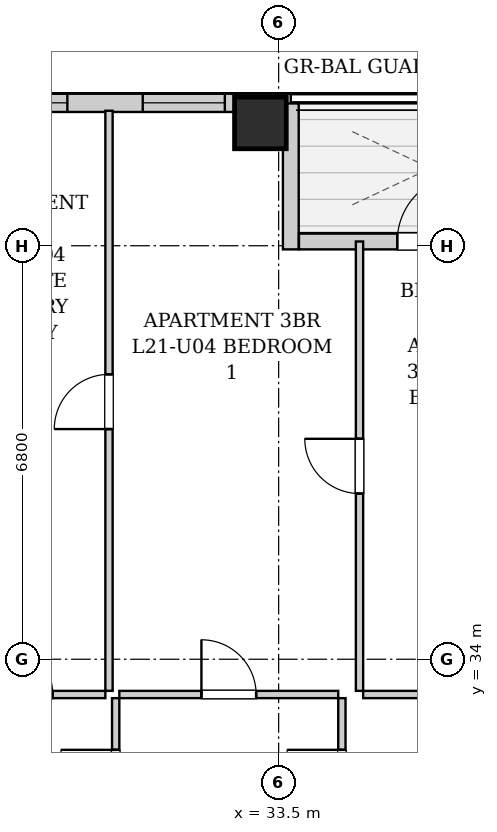
"""IFC4 building model, lengths in metres.
Left out: names, types, materials, properties, quantities, classifications, styles, units other than length and angle.
Written with IfcOpenShell. Run it as: python <this file> out.ifc"""

import sys

from ifc_helpers import new_model, si_unit, direction, frame, frame_2d, origin, origin_2d, place, context, subcontext, project, spatial, rectangle, extrude, element, fill, save


model = new_model("IFC4")
c1 = context("Model", 3, precision=1e-05, world=origin(), true_north=direction((0.0, 1.0)))
c2 = subcontext(c1, "Body", "Model", "MODEL_VIEW")
j1 = project(units=[si_unit("LENGTHUNIT", "METRE"), si_unit("PLANEANGLEUNIT", "RADIAN")], contexts=[c1])
p1 = place(None, origin())
s1 = spatial("IfcSite", under=j1, at=p1, CompositionType="ELEMENT")
p2 = place(p1, origin())
s2 = spatial("IfcBuilding", under=s1, at=p2, CompositionType="ELEMENT")
p3 = place(p2, frame((0.0, 0.0, 78.3)))
s3 = spatial("IfcBuildingStorey", under=s2, at=p3, CompositionType="ELEMENT", Elevation=78.3)
p4 = place(p3, frame((33.2, 42.82, 0.0), z_axis=(0.0, 0.0, 1.0), x_axis=(1.0, 0.0, 0.0)))
e1 = element("IfcColumn", 1, at=p4, inside=s3, PredefinedType="COLUMN", context=c2, shape_type="SweptSolid", body=[
    extrude(rectangle(XDim=0.85, YDim=0.85, at=origin_2d()), origin(), (0.0, 0.0, 1.0), 3.2),
])
p5 = place(p3, frame((10.0, 43.15, 0.0), z_axis=(0.0, 0.0, 1.0), x_axis=(1.0, 0.0, 0.0)))
e2 = element("IfcWall", 2, at=p5, inside=s3, PredefinedType="SOLIDWALL", context=c2, shape_type="SweptSolid", body=[
    extrude(rectangle(XDim=23.7, YDim=0.3, at=frame_2d((11.85, 0.0))), origin(), (0.0, 0.0, 1.0), 2.94),
])
p6 = place(p5, frame((5.625, 0.0, 0.55)))
e3 = element("IfcOpeningElement", 3, at=p6, cuts=e2, PredefinedType="OPENING", context=c2, shape_type="SweptSolid", body=[
    extrude(rectangle(XDim=1.35, YDim=1.2, at=frame_2d((0.675, 0.6))), frame((0.0, 0.16, 0.0), z_axis=(0.0, -1.0, 0.0), x_axis=(1.0, 0.0, 0.0)), (0.0, 0.0, 1.0), 0.32),
])
p7 = place(p5, frame((9.9, 0.0, 0.55)))
e4 = element("IfcOpeningElement", 4, at=p7, cuts=e2, PredefinedType="OPENING", context=c2, shape_type="SweptSolid", body=[
    extrude(rectangle(XDim=1.35, YDim=1.2, at=frame_2d((0.675, 0.6))), frame((0.0, 0.16, 0.0), z_axis=(0.0, -1.0, 0.0), x_axis=(1.0, 0.0, 0.0)), (0.0, 0.0, 1.0), 0.32),
])
p8 = place(p5, frame((18.675, 0.0, 0.55)))
e5 = element("IfcOpeningElement", 5, at=p8, cuts=e2, PredefinedType="OPENING", context=c2, shape_type="SweptSolid", body=[
    extrude(rectangle(XDim=1.35, YDim=1.2, at=frame_2d((0.675, 0.6))), frame((0.0, 0.16, 0.0), z_axis=(0.0, -1.0, 0.0), x_axis=(1.0, 0.0, 0.0)), (0.0, 0.0, 1.0), 0.32),
])
p9 = place(p5, frame((21.265, 0.0, 0.55)))
e6 = element("IfcOpeningElement", 6, at=p9, cuts=e2, PredefinedType="OPENING", context=c2, shape_type="SweptSolid", body=[
    extrude(rectangle(XDim=1.35, YDim=1.2, at=frame_2d((0.675, 0.6))), frame((0.0, 0.16, 0.0), z_axis=(0.0, -1.0, 0.0), x_axis=(1.0, 0.0, 0.0)), (0.0, 0.0, 1.0), 0.32),
])
p10 = place(p3, frame((33.7, 43.14, 0.0), z_axis=(0.0, 0.0, 1.0), x_axis=(0.0, -1.0, 0.0)))
e7 = element("IfcWall", 7, at=p10, inside=s3, PredefinedType="SOLIDWALL", context=c2, shape_type="SweptSolid", body=[
    extrude(rectangle(XDim=2.4, YDim=0.26, at=frame_2d((1.2, 0.0))), origin(), (0.0, 0.0, 1.0), 2.94),
])
p11 = place(p3, frame((33.834, 40.87, 0.0), z_axis=(0.0, 0.0, 1.0), x_axis=(1.0, 0.0, 0.0)))
e8 = element("IfcWall", 8, at=p11, inside=s3, PredefinedType="SOLIDWALL", context=c2, shape_type="SweptSolid", body=[
    extrude(rectangle(XDim=4.332, YDim=0.26, at=frame_2d((2.166, 0.0))), origin(), (0.0, 0.0, 1.0), 2.94),
])
p12 = place(p11, frame((1.616, 0.0, 0.0)))
e9 = element("IfcOpeningElement", 9, at=p12, cuts=e8, PredefinedType="OPENING", context=c2, shape_type="SweptSolid", body=[
    extrude(rectangle(XDim=1.1, YDim=2.0, at=frame_2d((0.55, 1.0))), frame((0.0, 0.14, 0.0), z_axis=(0.0, -1.0, 0.0), x_axis=(1.0, 0.0, 0.0)), (0.0, 0.0, 1.0), 0.28),
])
p13 = place(p11, frame((2.876, 0.0, 0.55)))
e10 = element("IfcOpeningElement", 10, at=p13, cuts=e8, PredefinedType="OPENING", context=c2, shape_type="SweptSolid", body=[
    extrude(rectangle(XDim=0.85, YDim=1.2, at=frame_2d((0.425, 0.6))), frame((0.0, 0.14, 0.0), z_axis=(0.0, -1.0, 0.0), x_axis=(1.0, 0.0, 0.0)), (0.0, 0.0, 1.0), 0.28),
])
p14 = place(p3, frame((30.82, 30.76, 0.0), z_axis=(0.0, 0.0, 1.0), x_axis=(0.0, 1.0, 0.0)))
e11 = element("IfcWall", 11, at=p14, inside=s3, PredefinedType="PARTITIONING", context=c2, shape_type="SweptSolid", body=[
    extrude(rectangle(XDim=2.6, YDim=0.12, at=frame_2d((1.3, 0.0))), origin(), (0.0, 0.0, 1.0), 2.94),
])
p15 = place(p14, frame((0.85, 0.0, 0.0)))
e12 = element("IfcOpeningElement", 12, at=p15, cuts=e11, PredefinedType="OPENING", context=c2, shape_type="SweptSolid", body=[
    extrude(rectangle(XDim=0.9, YDim=2.05, at=frame_2d((0.45, 1.025))), frame((0.0, 0.07, 0.0), z_axis=(0.0, -1.0, 0.0), x_axis=(1.0, 0.0, 0.0)), (0.0, 0.0, 1.0), 0.14),
])
p16 = place(p3, frame((28.02, 33.42, 0.0), z_axis=(0.0, 0.0, 1.0), x_axis=(1.0, 0.0, 0.0)))
e13 = element("IfcWall", 13, at=p16, inside=s3, PredefinedType="PARTITIONING", context=c2, shape_type="SweptSolid", body=[
    extrude(rectangle(XDim=2.63, YDim=0.12, at=frame_2d((1.315, 0.0))), origin(), (0.0, 0.0, 1.0), 2.94),
])
p17 = place(p16, frame((0.865, 0.0, 0.0)))
e14 = element("IfcOpeningElement", 14, at=p17, cuts=e13, PredefinedType="OPENING", context=c2, shape_type="SweptSolid", body=[
    extrude(rectangle(XDim=0.9, YDim=2.05, at=frame_2d((0.45, 1.025))), frame((0.0, 0.07, 0.0), z_axis=(0.0, -1.0, 0.0), x_axis=(1.0, 0.0, 0.0)), (0.0, 0.0, 1.0), 0.14),
])
p18 = place(p3, frame((34.54, 30.76, 0.0), z_axis=(0.0, 0.0, 1.0), x_axis=(0.0, 1.0, 0.0)))
e15 = element("IfcWall", 15, at=p18, inside=s3, PredefinedType="PARTITIONING", context=c2, shape_type="SweptSolid", body=[
    extrude(rectangle(XDim=2.6, YDim=0.12, at=frame_2d((1.3, 0.0))), origin(), (0.0, 0.0, 1.0), 2.94),
])
p19 = place(p18, frame((0.85, 0.0, 0.0)))
e16 = element("IfcOpeningElement", 16, at=p19, cuts=e15, PredefinedType="OPENING", context=c2, shape_type="SweptSolid", body=[
    extrude(rectangle(XDim=0.9, YDim=2.05, at=frame_2d((0.45, 1.025))), frame((0.0, 0.07, 0.0), z_axis=(0.0, -1.0, 0.0), x_axis=(1.0, 0.0, 0.0)), (0.0, 0.0, 1.0), 0.14),
])
p20 = place(p3, frame((30.88, 33.42, 0.0), z_axis=(0.0, 0.0, 1.0), x_axis=(1.0, 0.0, 0.0)))
e17 = element("IfcWall", 17, at=p20, inside=s3, PredefinedType="PARTITIONING", context=c2, shape_type="SweptSolid", body=[
    extrude(rectangle(XDim=3.6, YDim=0.12, at=frame_2d((1.8, 0.0))), origin(), (0.0, 0.0, 1.0), 2.94),
])
p21 = place(p20, frame((1.35, 0.0, 0.0)))
e18 = element("IfcOpeningElement", 18, at=p21, cuts=e17, PredefinedType="OPENING", context=c2, shape_type="SweptSolid", body=[
    extrude(rectangle(XDim=0.9, YDim=2.05, at=frame_2d((0.45, 1.025))), frame((0.0, 0.07, 0.0), z_axis=(0.0, -1.0, 0.0), x_axis=(1.0, 0.0, 0.0)), (0.0, 0.0, 1.0), 0.14),
])
p22 = place(p3, frame((34.89, 33.42, 0.0), z_axis=(0.0, 0.0, 1.0), x_axis=(1.0, 0.0, 0.0)))
e19 = element("IfcWall", 19, at=p22, inside=s3, PredefinedType="PARTITIONING", context=c2, shape_type="SweptSolid", body=[
    extrude(rectangle(XDim=2.86, YDim=0.12, at=frame_2d((1.43, 0.0))), origin(), (0.0, 0.0, 1.0), 2.94),
])
p23 = place(p22, frame((0.98, 0.0, 0.0)))
e20 = element("IfcOpeningElement", 20, at=p23, cuts=e19, PredefinedType="OPENING", context=c2, shape_type="SweptSolid", body=[
    extrude(rectangle(XDim=0.9, YDim=2.05, at=frame_2d((0.45, 1.025))), frame((0.0, 0.07, 0.0), z_axis=(0.0, -1.0, 0.0), x_axis=(1.0, 0.0, 0.0)), (0.0, 0.0, 1.0), 0.14),
])
p24 = place(p3, frame((30.71, 33.48, 0.0), z_axis=(0.0, 0.0, 1.0), x_axis=(0.0, 1.0, 0.0)))
e21 = element("IfcWall", 21, at=p24, inside=s3, PredefinedType="PARTITIONING", context=c2, shape_type="SweptSolid", body=[
    extrude(rectangle(XDim=9.54, YDim=0.12, at=frame_2d((4.77, 0.0))), origin(), (0.0, 0.0, 1.0), 2.94),
])
p25 = place(p24, frame((4.305, 0.0, 0.0)))
e22 = element("IfcOpeningElement", 22, at=p25, cuts=e21, PredefinedType="OPENING", context=c2, shape_type="SweptSolid", body=[
    extrude(rectangle(XDim=0.9, YDim=2.05, at=frame_2d((0.45, 1.025))), frame((0.0, 0.07, 0.0), z_axis=(0.0, -1.0, 0.0), x_axis=(1.0, 0.0, 0.0)), (0.0, 0.0, 1.0), 0.14),
])
p26 = place(p3, frame((34.83, 33.48, 0.0), z_axis=(0.0, 0.0, 1.0), x_axis=(0.0, 1.0, 0.0)))
e23 = element("IfcWall", 23, at=p26, inside=s3, PredefinedType="PARTITIONING", context=c2, shape_type="SweptSolid", body=[
    extrude(rectangle(XDim=7.39, YDim=0.12, at=frame_2d((3.695, 0.0))), origin(), (0.0, 0.0, 1.0), 2.94),
])
p27 = place(p26, frame((3.245, 0.0, 0.0)))
e24 = element("IfcOpeningElement", 24, at=p27, cuts=e23, PredefinedType="OPENING", context=c2, shape_type="SweptSolid", body=[
    extrude(rectangle(XDim=0.9, YDim=2.05, at=frame_2d((0.45, 1.025))), frame((0.0, 0.07, 0.0), z_axis=(0.0, -1.0, 0.0), x_axis=(1.0, 0.0, 0.0)), (0.0, 0.0, 1.0), 0.14),
])
p28 = place(p15, origin())
e25 = element("IfcDoor", 25, at=p28, inside=s3, OperationType="SINGLE_SWING_RIGHT", PredefinedType="DOOR", context=c2, shape_type="SweptSolid", body=[
    extrude(rectangle(XDim=0.9, YDim=2.05, at=frame_2d((0.45, 1.025))), frame((0.0, 0.025, 0.0), z_axis=(0.0, -1.0, 0.0), x_axis=(1.0, 0.0, 0.0)), (0.0, 0.0, 1.0), 0.05),
])
fill(e12, e25)
p29 = place(p17, origin())
e26 = element("IfcDoor", 26, at=p29, inside=s3, OperationType="SINGLE_SWING_LEFT", PredefinedType="DOOR", context=c2, shape_type="SweptSolid", body=[
    extrude(rectangle(XDim=0.9, YDim=2.05, at=frame_2d((0.45, 1.025))), frame((0.0, 0.025, 0.0), z_axis=(0.0, -1.0, 0.0), x_axis=(1.0, 0.0, 0.0)), (0.0, 0.0, 1.0), 0.05),
])
fill(e14, e26)
p30 = place(p19, origin())
e27 = element("IfcDoor", 27, at=p30, inside=s3, OperationType="SINGLE_SWING_RIGHT", PredefinedType="DOOR", context=c2, shape_type="SweptSolid", body=[
    extrude(rectangle(XDim=0.9, YDim=2.05, at=frame_2d((0.45, 1.025))), frame((0.0, 0.025, 0.0), z_axis=(0.0, -1.0, 0.0), x_axis=(1.0, 0.0, 0.0)), (0.0, 0.0, 1.0), 0.05),
])
fill(e16, e27)
p31 = place(p21, origin())
e28 = element("IfcDoor", 28, at=p31, inside=s3, OperationType="SINGLE_SWING_LEFT", PredefinedType="DOOR", context=c2, shape_type="SweptSolid", body=[
    extrude(rectangle(XDim=0.9, YDim=2.05, at=frame_2d((0.45, 1.025))), frame((0.0, 0.025, 0.0), z_axis=(0.0, -1.0, 0.0), x_axis=(1.0, 0.0, 0.0)), (0.0, 0.0, 1.0), 0.05),
])
fill(e18, e28)
p32 = place(p25, origin())
e29 = element("IfcDoor", 29, at=p32, inside=s3, OperationType="SINGLE_SWING_LEFT", PredefinedType="DOOR", context=c2, shape_type="SweptSolid", body=[
    extrude(rectangle(XDim=0.9, YDim=2.05, at=frame_2d((0.45, 1.025))), frame((0.0, 0.025, 0.0), z_axis=(0.0, -1.0, 0.0), x_axis=(1.0, 0.0, 0.0)), (0.0, 0.0, 1.0), 0.05),
])
fill(e22, e29)
p33 = place(p27, origin())
e30 = element("IfcDoor", 30, at=p33, inside=s3, OperationType="SINGLE_SWING_RIGHT", PredefinedType="DOOR", context=c2, shape_type="SweptSolid", body=[
    extrude(rectangle(XDim=0.9, YDim=2.05, at=frame_2d((0.45, 1.025))), frame((0.0, 0.025, 0.0), z_axis=(0.0, -1.0, 0.0), x_axis=(1.0, 0.0, 0.0)), (0.0, 0.0, 1.0), 0.05),
])
fill(e24, e30)
p34 = place(p12, origin())
e31 = element("IfcDoor", 31, at=p34, inside=s3, OperationType="SINGLE_SWING_RIGHT", PredefinedType="DOOR", context=c2, shape_type="SweptSolid", body=[
    extrude(rectangle(XDim=1.1, YDim=2.0, at=frame_2d((0.55, 1.0))), frame((0.0, 0.025, 0.0), z_axis=(0.0, -1.0, 0.0), x_axis=(1.0, 0.0, 0.0)), (0.0, 0.0, 1.0), 0.05),
])
fill(e9, e31)
p35 = place(p8, origin())
e32 = element("IfcWindow", 32, at=p35, inside=s3, PartitioningType="SINGLE_PANEL", PredefinedType="WINDOW", context=c2, shape_type="SweptSolid", body=[
    extrude(rectangle(XDim=1.35, YDim=1.2, at=frame_2d((0.675, 0.6))), frame((0.0, 0.03, 0.0), z_axis=(0.0, -1.0, 0.0), x_axis=(1.0, 0.0, 0.0)), (0.0, 0.0, 1.0), 0.06),
])
fill(e5, e32)
p36 = place(p9, origin())
e33 = element("IfcWindow", 33, at=p36, inside=s3, PartitioningType="SINGLE_PANEL", PredefinedType="WINDOW", context=c2, shape_type="SweptSolid", body=[
    extrude(rectangle(XDim=1.35, YDim=1.2, at=frame_2d((0.675, 0.6))), frame((0.0, 0.03, 0.0), z_axis=(0.0, -1.0, 0.0), x_axis=(1.0, 0.0, 0.0)), (0.0, 0.0, 1.0), 0.06),
])
fill(e6, e33)
save(model, sys.argv[1])
